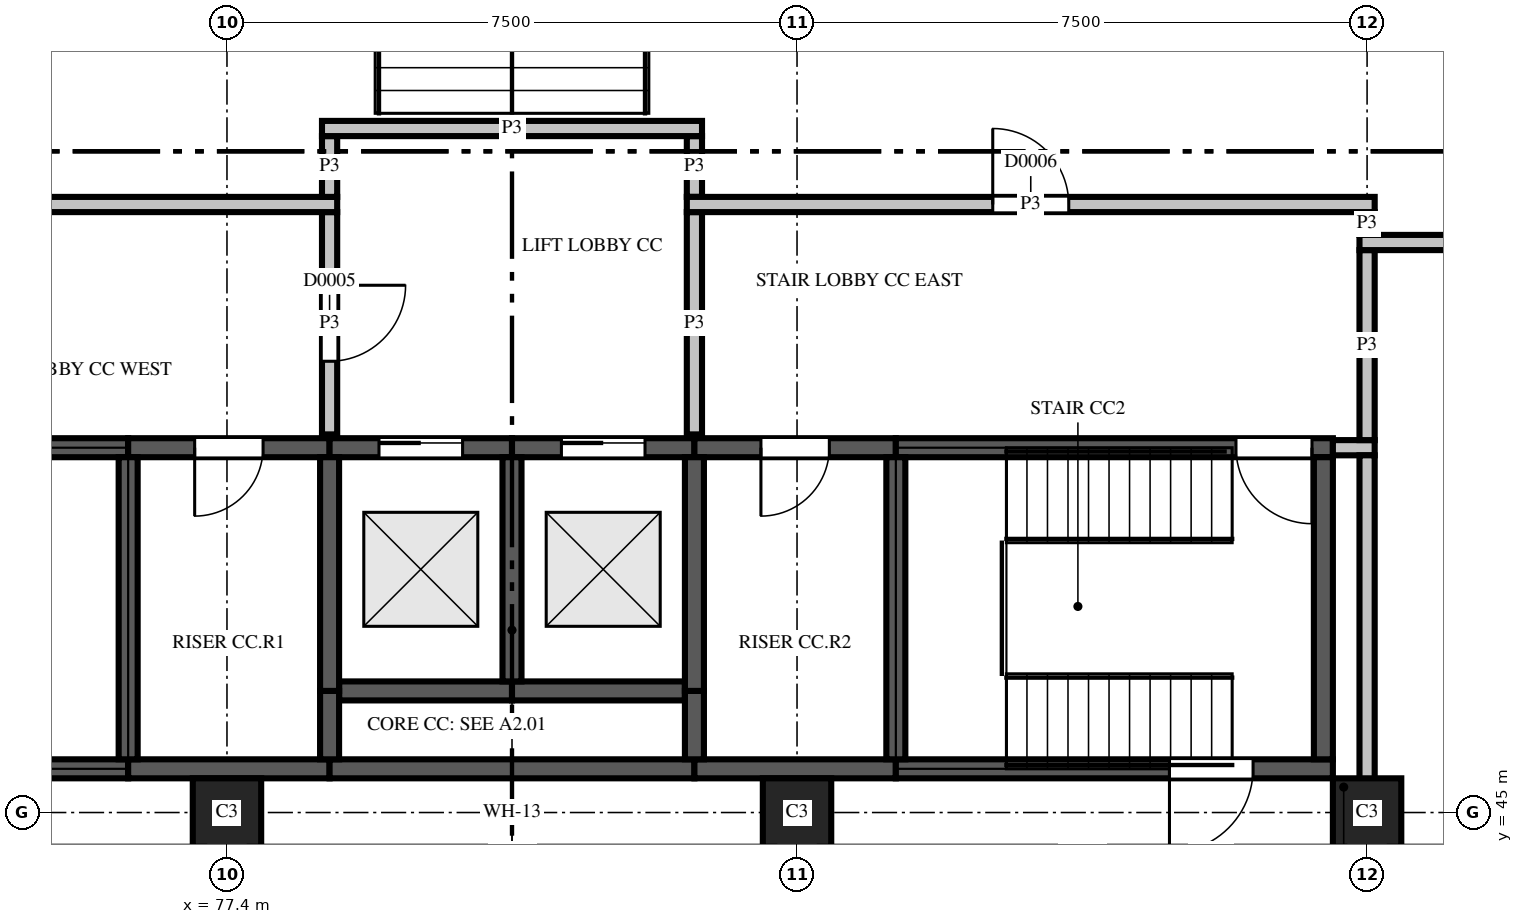
"""IFC4 building model, lengths in metres.
Left out: names, types, materials, properties, quantities, classifications, styles, units other than length and angle.
Written with IfcOpenShell. Run it as: python <this file> out.ifc"""

import sys

from ifc_helpers import new_model, si_unit, direction, frame, frame_2d, origin, place, context, subcontext, project, spatial, polyline, rectangle, outline, extrude, element, fill, save


model = new_model("IFC4")
c1 = context("Model", 3, precision=1e-05, world=origin(), true_north=direction((0.0, 1.0)))
c2 = subcontext(c1, "Body", "Model", "MODEL_VIEW")
j1 = project(units=[si_unit("LENGTHUNIT", "METRE"), si_unit("PLANEANGLEUNIT", "RADIAN")], contexts=[c1])
p1 = place(None, origin())
s1 = spatial("IfcSite", under=j1, at=p1, CompositionType="ELEMENT")
p2 = place(p1, origin())
s2 = spatial("IfcBuilding", under=s1, at=p2, CompositionType="ELEMENT")
p3 = place(p2, origin())
s3 = spatial("IfcBuildingStorey", under=s2, at=p3, CompositionType="ELEMENT", Elevation=0.0)
for number, where, z_axis, x_axis in (
    (1, (77.4, 45.0, 0.0), (0.0, 0.0, 1.0), (0.0, -1.0, 0.0)),
    (2, (84.9, 45.0, 0.0), (0.0, 0.0, 1.0), (0.0, -1.0, 0.0)),
    (3, (92.4, 45.0, 0.0), (0.0, 0.0, 1.0), (0.0, -1.0, 0.0)),
):
    element("IfcColumn", number, at=place(p3, frame(where, z_axis=z_axis, x_axis=x_axis)), inside=s3, PredefinedType="COLUMN", context=c2, shape_type="SweptSolid", body=[
        extrude(outline(polyline([(-0.45, -0.45), (0.45, -0.45), (0.45, -0.3), (0.75, -0.3), (0.75, 0.3), (0.45, 0.3), (0.45, 0.45), (-0.45, 0.45), (-0.45, -0.45)])), origin(), (0.0, 0.0, 1.0), 4.5),
    ])
p4 = place(p3, frame((70.35, 45.575, 0.0), z_axis=(0.0, 0.0, 1.0), x_axis=(1.0, 0.0, 0.0)))
e4 = element("IfcWall", 4, at=p4, inside=s3, PredefinedType="SHEAR", context=c2, shape_type="SweptSolid", body=[
    extrude(rectangle(XDim=5.75, YDim=0.25, at=frame_2d((2.875, 0.0))), origin(), (0.0, 0.0, 1.0), 4.5),
])
p5 = place(p4, frame((1.05, 0.0, 0.0)))
e5 = element("IfcOpeningElement", 5, at=p5, cuts=e4, PredefinedType="OPENING", context=c2, shape_type="SweptSolid", body=[
    extrude(rectangle(XDim=1.1, YDim=2.1, at=frame_2d((0.55, 1.05))), frame((0.0, 0.135, 0.0), z_axis=(0.0, -1.0, 0.0), x_axis=(1.0, 0.0, 0.0)), (0.0, 0.0, 1.0), 0.27),
])
p6 = place(p3, frame((76.1, 45.575, 0.0), z_axis=(0.0, 0.0, 1.0), x_axis=(1.0, 0.0, 0.0)))
e6 = element("IfcWall", 6, at=p6, inside=s3, PredefinedType="SHEAR", context=c2, shape_type="SweptSolid", body=[
    extrude(rectangle(XDim=2.65, YDim=0.25, at=frame_2d((1.325, 0.0))), origin(), (0.0, 0.0, 1.0), 4.5),
])
p7 = place(p3, frame((78.75, 45.575, 0.0), z_axis=(0.0, 0.0, 1.0), x_axis=(1.0, 0.0, 0.0)))
e7 = element("IfcWall", 7, at=p7, inside=s3, PredefinedType="SHEAR", context=c2, shape_type="SweptSolid", body=[
    extrude(rectangle(XDim=4.8, YDim=0.25, at=frame_2d((2.4, 0.0))), origin(), (0.0, 0.0, 1.0), 4.5),
])
p8 = place(p3, frame((83.55, 45.575, 0.0), z_axis=(0.0, 0.0, 1.0), x_axis=(1.0, 0.0, 0.0)))
e8 = element("IfcWall", 8, at=p8, inside=s3, PredefinedType="SHEAR", context=c2, shape_type="SweptSolid", body=[
    extrude(rectangle(XDim=2.65, YDim=0.25, at=frame_2d((1.325, 0.0))), origin(), (0.0, 0.0, 1.0), 4.5),
])
p9 = place(p3, frame((86.2, 45.575, 0.0), z_axis=(0.0, 0.0, 1.0), x_axis=(1.0, 0.0, 0.0)))
e9 = element("IfcWall", 9, at=p9, inside=s3, PredefinedType="SHEAR", context=c2, shape_type="SweptSolid", body=[
    extrude(rectangle(XDim=5.75, YDim=0.25, at=frame_2d((2.875, 0.0))), origin(), (0.0, 0.0, 1.0), 4.5),
])
p10 = place(p9, frame((3.6, 0.0, 0.0)))
e10 = element("IfcOpeningElement", 10, at=p10, cuts=e9, PredefinedType="OPENING", context=c2, shape_type="SweptSolid", body=[
    extrude(rectangle(XDim=1.1, YDim=2.1, at=frame_2d((0.55, 1.05))), frame((0.0, 0.135, 0.0), z_axis=(0.0, -1.0, 0.0), x_axis=(1.0, 0.0, 0.0)), (0.0, 0.0, 1.0), 0.27),
])
p11 = place(p3, frame((78.875, 46.6, -1.4), z_axis=(0.0, 0.0, 1.0), x_axis=(1.0, 0.0, 0.0)))
e11 = element("IfcWall", 11, at=p11, inside=s3, PredefinedType="SHEAR", context=c2, shape_type="SweptSolid", body=[
    extrude(rectangle(XDim=2.275, YDim=0.25, at=frame_2d((1.137, 0.0))), origin(), (0.0, 0.0, 1.0), 5.9),
])
p12 = place(p3, frame((81.15, 46.6, -1.4), z_axis=(0.0, 0.0, 1.0), x_axis=(1.0, 0.0, 0.0)))
e12 = element("IfcWall", 12, at=p12, inside=s3, PredefinedType="SHEAR", context=c2, shape_type="SweptSolid", body=[
    extrude(rectangle(XDim=2.275, YDim=0.25, at=frame_2d((1.138, 0.0))), origin(), (0.0, 0.0, 1.0), 5.9),
])
p13 = place(p3, frame((70.35, 49.8, 0.0), z_axis=(0.0, 0.0, 1.0), x_axis=(1.0, 0.0, 0.0)))
e13 = element("IfcWall", 13, at=p13, inside=s3, PredefinedType="SHEAR", context=c2, shape_type="SweptSolid", body=[
    extrude(rectangle(XDim=5.75, YDim=0.25, at=frame_2d((2.875, 0.0))), origin(), (0.0, 0.0, 1.0), 4.5),
])
p14 = place(p13, frame((0.275, 0.0, 0.0)))
e14 = element("IfcOpeningElement", 14, at=p14, cuts=e13, PredefinedType="OPENING", context=c2, shape_type="SweptSolid", body=[
    extrude(rectangle(XDim=1.0, YDim=2.1, at=frame_2d((0.5, 1.05))), frame((0.0, 0.135, 0.0), z_axis=(0.0, -1.0, 0.0), x_axis=(1.0, 0.0, 0.0)), (0.0, 0.0, 1.0), 0.27),
])
p15 = place(p3, frame((76.1, 49.8, 0.0), z_axis=(0.0, 0.0, 1.0), x_axis=(1.0, 0.0, 0.0)))
e15 = element("IfcWall", 15, at=p15, inside=s3, PredefinedType="SHEAR", context=c2, shape_type="SweptSolid", body=[
    extrude(rectangle(XDim=2.65, YDim=0.25, at=frame_2d((1.325, 0.0))), origin(), (0.0, 0.0, 1.0), 4.5),
])
p16 = place(p15, frame((0.875, 0.0, 0.0)))
e16 = element("IfcOpeningElement", 16, at=p16, cuts=e15, PredefinedType="OPENING", context=c2, shape_type="SweptSolid", body=[
    extrude(rectangle(XDim=0.9, YDim=2.1, at=frame_2d((0.45, 1.05))), frame((0.0, 0.135, 0.0), z_axis=(0.0, -1.0, 0.0), x_axis=(1.0, 0.0, 0.0)), (0.0, 0.0, 1.0), 0.27),
])
p17 = place(p3, frame((78.75, 49.8, -1.4), z_axis=(0.0, 0.0, 1.0), x_axis=(1.0, 0.0, 0.0)))
e17 = element("IfcWall", 17, at=p17, inside=s3, PredefinedType="SHEAR", context=c2, shape_type="SweptSolid", body=[
    extrude(rectangle(XDim=2.4, YDim=0.25, at=frame_2d((1.2, 0.0))), origin(), (0.0, 0.0, 1.0), 5.9),
])
p18 = place(p17, frame((0.65, 0.0, 1.4)))
e18 = element("IfcOpeningElement", 18, at=p18, cuts=e17, PredefinedType="OPENING", context=c2, shape_type="SweptSolid", body=[
    extrude(rectangle(XDim=1.1, YDim=2.1, at=frame_2d((0.55, 1.05))), frame((0.0, 0.135, 0.0), z_axis=(0.0, -1.0, 0.0), x_axis=(1.0, 0.0, 0.0)), (0.0, 0.0, 1.0), 0.27),
])
p19 = place(p3, frame((81.15, 49.8, -1.4), z_axis=(0.0, 0.0, 1.0), x_axis=(1.0, 0.0, 0.0)))
e19 = element("IfcWall", 19, at=p19, inside=s3, PredefinedType="SHEAR", context=c2, shape_type="SweptSolid", body=[
    extrude(rectangle(XDim=2.4, YDim=0.25, at=frame_2d((1.2, 0.0))), origin(), (0.0, 0.0, 1.0), 5.9),
])
p20 = place(p19, frame((0.65, 0.0, 1.4)))
e20 = element("IfcOpeningElement", 20, at=p20, cuts=e19, PredefinedType="OPENING", context=c2, shape_type="SweptSolid", body=[
    extrude(rectangle(XDim=1.1, YDim=2.1, at=frame_2d((0.55, 1.05))), frame((0.0, 0.135, 0.0), z_axis=(0.0, -1.0, 0.0), x_axis=(1.0, 0.0, 0.0)), (0.0, 0.0, 1.0), 0.27),
])
p21 = place(p3, frame((83.55, 49.8, 0.0), z_axis=(0.0, 0.0, 1.0), x_axis=(1.0, 0.0, 0.0)))
e21 = element("IfcWall", 21, at=p21, inside=s3, PredefinedType="SHEAR", context=c2, shape_type="SweptSolid", body=[
    extrude(rectangle(XDim=2.65, YDim=0.25, at=frame_2d((1.325, 0.0))), origin(), (0.0, 0.0, 1.0), 4.5),
])
p22 = place(p21, frame((0.875, 0.0, 0.0)))
e22 = element("IfcOpeningElement", 22, at=p22, cuts=e21, PredefinedType="OPENING", context=c2, shape_type="SweptSolid", body=[
    extrude(rectangle(XDim=0.9, YDim=2.1, at=frame_2d((0.45, 1.05))), frame((0.0, 0.135, 0.0), z_axis=(0.0, -1.0, 0.0), x_axis=(1.0, 0.0, 0.0)), (0.0, 0.0, 1.0), 0.27),
])
p23 = place(p3, frame((86.2, 49.8, 0.0), z_axis=(0.0, 0.0, 1.0), x_axis=(1.0, 0.0, 0.0)))
e23 = element("IfcWall", 23, at=p23, inside=s3, PredefinedType="SHEAR", context=c2, shape_type="SweptSolid", body=[
    extrude(rectangle(XDim=5.75, YDim=0.25, at=frame_2d((2.875, 0.0))), origin(), (0.0, 0.0, 1.0), 4.5),
])
p24 = place(p23, frame((4.475, 0.0, 0.0)))
e24 = element("IfcOpeningElement", 24, at=p24, cuts=e23, PredefinedType="OPENING", context=c2, shape_type="SweptSolid", body=[
    extrude(rectangle(XDim=1.0, YDim=2.1, at=frame_2d((0.5, 1.05))), frame((0.0, 0.135, 0.0), z_axis=(0.0, -1.0, 0.0), x_axis=(1.0, 0.0, 0.0)), (0.0, 0.0, 1.0), 0.27),
])
p25 = place(p3, frame((76.1, 45.7, 0.0), z_axis=(0.0, 0.0, 1.0), x_axis=(0.0, 1.0, 0.0)))
e25 = element("IfcWall", 25, at=p25, inside=s3, PredefinedType="SHEAR", context=c2, shape_type="SweptSolid", body=[
    extrude(rectangle(XDim=3.975, YDim=0.25, at=frame_2d((1.988, 0.0))), origin(), (0.0, 0.0, 1.0), 4.5),
])
p26 = place(p3, frame((78.75, 45.7, 0.0), z_axis=(0.0, 0.0, 1.0), x_axis=(0.0, 1.0, 0.0)))
e26 = element("IfcWall", 26, at=p26, inside=s3, PredefinedType="SHEAR", context=c2, shape_type="SweptSolid", body=[
    extrude(rectangle(XDim=0.9, YDim=0.25, at=frame_2d((0.45, 0.0))), origin(), (0.0, 0.0, 1.0), 4.5),
])
p27 = place(p3, frame((78.75, 46.6, -1.4), z_axis=(0.0, 0.0, 1.0), x_axis=(0.0, 1.0, 0.0)))
e27 = element("IfcWall", 27, at=p27, inside=s3, PredefinedType="SHEAR", context=c2, shape_type="SweptSolid", body=[
    extrude(rectangle(XDim=3.075, YDim=0.25, at=frame_2d((1.538, 0.0))), origin(), (0.0, 0.0, 1.0), 5.9),
])
p28 = place(p3, frame((81.15, 46.725, -1.4), z_axis=(0.0, 0.0, 1.0), x_axis=(0.0, 1.0, 0.0)))
e28 = element("IfcWall", 28, at=p28, inside=s3, PredefinedType="SHEAR", context=c2, shape_type="SweptSolid", body=[
    extrude(rectangle(XDim=2.95, YDim=0.25, at=frame_2d((1.475, 0.0))), origin(), (0.0, 0.0, 1.0), 5.9),
])
p29 = place(p3, frame((83.55, 45.7, 0.0), z_axis=(0.0, 0.0, 1.0), x_axis=(0.0, 1.0, 0.0)))
e29 = element("IfcWall", 29, at=p29, inside=s3, PredefinedType="SHEAR", context=c2, shape_type="SweptSolid", body=[
    extrude(rectangle(XDim=0.9, YDim=0.25, at=frame_2d((0.45, 0.0))), origin(), (0.0, 0.0, 1.0), 4.5),
])
p30 = place(p3, frame((83.55, 46.6, -1.4), z_axis=(0.0, 0.0, 1.0), x_axis=(0.0, 1.0, 0.0)))
e30 = element("IfcWall", 30, at=p30, inside=s3, PredefinedType="SHEAR", context=c2, shape_type="SweptSolid", body=[
    extrude(rectangle(XDim=3.075, YDim=0.25, at=frame_2d((1.538, 0.0))), origin(), (0.0, 0.0, 1.0), 5.9),
])
for number, where, z_axis, x_axis in (
    (31, (86.2, 45.7, 0.0), (0.0, 0.0, 1.0), (0.0, 1.0, 0.0)),
    (32, (91.825, 45.7, 0.0), (0.0, 0.0, 1.0), (0.0, 1.0, 0.0)),
):
    element("IfcWall", number, at=place(p3, frame(where, z_axis=z_axis, x_axis=x_axis)), inside=s3, PredefinedType="SHEAR", context=c2, shape_type="SweptSolid", body=[
        extrude(rectangle(XDim=3.975, YDim=0.25, at=frame_2d((1.988, 0.0))), origin(), (0.0, 0.0, 1.0), 4.5),
    ])
p31 = place(p3, frame((91.95, 49.8, 0.0), z_axis=(0.0, 0.0, 1.0), x_axis=(1.0, 0.0, 0.0)))
e33 = element("IfcWall", 33, at=p31, inside=s3, PredefinedType="PARTITIONING", context=c2, shape_type="SweptSolid", body=[
    extrude(rectangle(XDim=0.55, YDim=0.2, at=frame_2d((0.275, 0.0))), origin(), (0.0, 0.0, 1.0), 3.68),
])
p32 = place(p3, frame((92.4, 49.7, 0.0), z_axis=(0.0, 0.0, 1.0), x_axis=(0.0, -1.0, 0.0)))
e34 = element("IfcWall", 34, at=p32, inside=s3, PredefinedType="PARTITIONING", context=c2, shape_type="SweptSolid", body=[
    extrude(rectangle(XDim=4.64, YDim=0.2, at=frame_2d((2.32, 0.0))), origin(), (0.0, 0.0, 1.0), 3.68),
])
p33 = place(p3, frame((92.4, 49.9, 0.0), z_axis=(0.0, 0.0, 1.0), x_axis=(0.0, 1.0, 0.0)))
e35 = element("IfcWall", 35, at=p33, inside=s3, PredefinedType="PARTITIONING", context=c2, shape_type="SweptSolid", body=[
    extrude(rectangle(XDim=2.5, YDim=0.2, at=frame_2d((1.25, 0.0))), origin(), (0.0, 0.0, 1.0), 3.68),
])
p34 = place(p3, frame((78.75, 49.975, 0.0), z_axis=(0.0, 0.0, 1.0), x_axis=(0.0, 1.0, 0.0)))
e36 = element("IfcWall", 36, at=p34, inside=s3, PredefinedType="PARTITIONING", context=c2, shape_type="SweptSolid", body=[
    extrude(rectangle(XDim=2.925, YDim=0.2, at=frame_2d((1.462, 0.0))), origin(), (0.0, 0.0, 1.0), 3.68),
])
p35 = place(p34, frame((0.962, 0.0, 0.0)))
e37 = element("IfcOpeningElement", 37, at=p35, cuts=e36, PredefinedType="OPENING", context=c2, shape_type="SweptSolid", body=[
    extrude(rectangle(XDim=1.0, YDim=2.1, at=frame_2d((0.5, 1.05))), frame((0.0, 0.11, 0.0), z_axis=(0.0, -1.0, 0.0), x_axis=(1.0, 0.0, 0.0)), (0.0, 0.0, 1.0), 0.22),
])
p36 = place(p3, frame((83.55, 49.975, 0.0), z_axis=(0.0, 0.0, 1.0), x_axis=(0.0, 1.0, 0.0)))
e38 = element("IfcWall", 38, at=p36, inside=s3, PredefinedType="PARTITIONING", context=c2, shape_type="SweptSolid", body=[
    extrude(rectangle(XDim=2.925, YDim=0.2, at=frame_2d((1.462, 0.0))), origin(), (0.0, 0.0, 1.0), 3.68),
])
p37 = place(p3, frame((92.4, 52.6, 0.0), z_axis=(0.0, 0.0, 1.0), x_axis=(0.0, 1.0, 0.0)))
e39 = element("IfcWall", 39, at=p37, inside=s3, PredefinedType="PARTITIONING", context=c2, shape_type="SweptSolid", body=[
    extrude(rectangle(XDim=0.3, YDim=0.2, at=frame_2d((0.15, 0.0))), origin(), (0.0, 0.0, 1.0), 3.68),
])
p38 = place(p3, frame((99.9, 52.5, 0.0), z_axis=(0.0, 0.0, 1.0), x_axis=(-1.0, 0.0, 0.0)))
e40 = element("IfcWall", 40, at=p38, inside=s3, PredefinedType="PARTITIONING", context=c2, shape_type="SweptSolid", body=[
    extrude(rectangle(XDim=7.6, YDim=0.2, at=frame_2d((3.8, 0.0))), origin(), (0.0, 0.0, 1.0), 3.68),
])
p39 = place(p38, frame((3.3, 0.0, 0.0)))
e41 = element("IfcOpeningElement", 41, at=p39, cuts=e40, PredefinedType="OPENING", context=c2, shape_type="SweptSolid", body=[
    extrude(rectangle(XDim=1.0, YDim=2.1, at=frame_2d((0.5, 1.05))), frame((0.0, 0.11, 0.0), z_axis=(0.0, -1.0, 0.0), x_axis=(1.0, 0.0, 0.0)), (0.0, 0.0, 1.0), 0.22),
])
p40 = place(p3, frame((78.85, 53.0, 0.0), z_axis=(0.0, 0.0, 1.0), x_axis=(-1.0, 0.0, 0.0)))
e42 = element("IfcWall", 42, at=p40, inside=s3, PredefinedType="PARTITIONING", context=c2, shape_type="SweptSolid", body=[
    extrude(rectangle(XDim=9.05, YDim=0.2, at=frame_2d((4.525, 0.0))), origin(), (0.0, 0.0, 1.0), 3.68),
])
p41 = place(p40, frame((4.025, 0.0, 0.0)))
e43 = element("IfcOpeningElement", 43, at=p41, cuts=e42, PredefinedType="OPENING", context=c2, shape_type="SweptSolid", body=[
    extrude(rectangle(XDim=1.0, YDim=2.1, at=frame_2d((0.5, 1.05))), frame((0.0, 0.11, 0.0), z_axis=(0.0, -1.0, 0.0), x_axis=(1.0, 0.0, 0.0)), (0.0, 0.0, 1.0), 0.22),
])
p42 = place(p3, frame((83.55, 53.1, 0.0), z_axis=(0.0, 0.0, 1.0), x_axis=(0.0, 1.0, 0.0)))
e44 = element("IfcWall", 44, at=p42, inside=s3, PredefinedType="PARTITIONING", context=c2, shape_type="SweptSolid", body=[
    extrude(rectangle(XDim=0.8, YDim=0.2, at=frame_2d((0.4, 0.0))), origin(), (0.0, 0.0, 1.0), 3.68),
])
p43 = place(p3, frame((92.5, 53.0, 0.0), z_axis=(0.0, 0.0, 1.0), x_axis=(-1.0, 0.0, 0.0)))
e45 = element("IfcWall", 45, at=p43, inside=s3, PredefinedType="PARTITIONING", context=c2, shape_type="SweptSolid", body=[
    extrude(rectangle(XDim=9.05, YDim=0.2, at=frame_2d((4.525, 0.0))), origin(), (0.0, 0.0, 1.0), 3.68),
])
p44 = place(p43, frame((4.025, 0.0, 0.0)))
e46 = element("IfcOpeningElement", 46, at=p44, cuts=e45, PredefinedType="OPENING", context=c2, shape_type="SweptSolid", body=[
    extrude(rectangle(XDim=1.0, YDim=2.1, at=frame_2d((0.5, 1.05))), frame((0.0, 0.11, 0.0), z_axis=(0.0, -1.0, 0.0), x_axis=(1.0, 0.0, 0.0)), (0.0, 0.0, 1.0), 0.22),
])
p45 = place(p3, frame((78.75, 53.9, 0.0), z_axis=(0.0, 0.0, 1.0), x_axis=(0.0, -1.0, 0.0)))
e47 = element("IfcWall", 47, at=p45, inside=s3, PredefinedType="PARTITIONING", context=c2, shape_type="SweptSolid", body=[
    extrude(rectangle(XDim=0.8, YDim=0.2, at=frame_2d((0.4, 0.0))), origin(), (0.0, 0.0, 1.0), 3.68),
])
p46 = place(p3, frame((83.65, 54.0, 0.0), z_axis=(0.0, 0.0, 1.0), x_axis=(-1.0, 0.0, 0.0)))
e48 = element("IfcWall", 48, at=p46, inside=s3, PredefinedType="PARTITIONING", context=c2, shape_type="SweptSolid", body=[
    extrude(rectangle(XDim=5.0, YDim=0.2, at=frame_2d((2.5, 0.0))), origin(), (0.0, 0.0, 1.0), 3.68),
])
p47 = place(p10, frame((1.1, 0.0, 0.0), z_axis=(0.0, 0.0, 1.0), x_axis=(-1.0, 0.0, 0.0)))
e49 = element("IfcDoor", 49, at=p47, inside=s3, OperationType="SINGLE_SWING_LEFT", PredefinedType="DOOR", context=c2, shape_type="SweptSolid", body=[
    extrude(rectangle(XDim=1.1, YDim=2.1, at=frame_2d((0.55, 1.05))), frame((0.0, 0.025, 0.0), z_axis=(0.0, -1.0, 0.0), x_axis=(1.0, 0.0, 0.0)), (0.0, 0.0, 1.0), 0.05),
])
fill(e10, e49)
p48 = place(p35, origin())
e50 = element("IfcDoor", 50, at=p48, inside=s3, OperationType="SINGLE_SWING_RIGHT", PredefinedType="DOOR", context=c2, shape_type="SweptSolid", body=[
    extrude(rectangle(XDim=1.0, YDim=2.1, at=frame_2d((0.5, 1.05))), frame((0.0, 0.025, 0.0), z_axis=(0.0, -1.0, 0.0), x_axis=(1.0, 0.0, 0.0)), (0.0, 0.0, 1.0), 0.05),
])
fill(e37, e50)
p49 = place(p44, origin())
e51 = element("IfcDoor", 51, at=p49, inside=s3, OperationType="SINGLE_SWING_RIGHT", PredefinedType="DOOR", context=c2, shape_type="SweptSolid", body=[
    extrude(rectangle(XDim=1.0, YDim=2.1, at=frame_2d((0.5, 1.05))), frame((0.0, 0.025, 0.0), z_axis=(0.0, -1.0, 0.0), x_axis=(1.0, 0.0, 0.0)), (0.0, 0.0, 1.0), 0.05),
])
fill(e46, e51)
p50 = place(p18, origin())
e52 = element("IfcDoor", 52, at=p50, inside=s3, OperationType="SLIDING_TO_LEFT", PredefinedType="DOOR", context=c2, shape_type="SweptSolid", body=[
    extrude(rectangle(XDim=1.1, YDim=2.1, at=frame_2d((0.55, 1.05))), frame((0.0, 0.025, 0.0), z_axis=(0.0, -1.0, 0.0), x_axis=(1.0, 0.0, 0.0)), (0.0, 0.0, 1.0), 0.05),
])
fill(e18, e52)
p51 = place(p20, origin())
e53 = element("IfcDoor", 53, at=p51, inside=s3, OperationType="SLIDING_TO_LEFT", PredefinedType="DOOR", context=c2, shape_type="SweptSolid", body=[
    extrude(rectangle(XDim=1.1, YDim=2.1, at=frame_2d((0.55, 1.05))), frame((0.0, 0.025, 0.0), z_axis=(0.0, -1.0, 0.0), x_axis=(1.0, 0.0, 0.0)), (0.0, 0.0, 1.0), 0.05),
])
fill(e20, e53)
p52 = place(p24, origin())
e54 = element("IfcDoor", 54, at=p52, inside=s3, OperationType="SINGLE_SWING_RIGHT", PredefinedType="DOOR", context=c2, shape_type="SweptSolid", body=[
    extrude(rectangle(XDim=1.0, YDim=2.1, at=frame_2d((0.5, 1.05))), frame((0.0, 0.025, 0.0), z_axis=(0.0, -1.0, 0.0), x_axis=(1.0, 0.0, 0.0)), (0.0, 0.0, 1.0), 0.05),
])
fill(e24, e54)
p53 = place(p16, origin())
e55 = element("IfcDoor", 55, at=p53, inside=s3, OperationType="SINGLE_SWING_LEFT", PredefinedType="DOOR", context=c2, shape_type="SweptSolid", body=[
    extrude(rectangle(XDim=0.9, YDim=2.1, at=frame_2d((0.45, 1.05))), frame((0.0, 0.025, 0.0), z_axis=(0.0, -1.0, 0.0), x_axis=(1.0, 0.0, 0.0)), (0.0, 0.0, 1.0), 0.05),
])
fill(e16, e55)
p54 = place(p22, origin())
e56 = element("IfcDoor", 56, at=p54, inside=s3, OperationType="SINGLE_SWING_LEFT", PredefinedType="DOOR", context=c2, shape_type="SweptSolid", body=[
    extrude(rectangle(XDim=0.9, YDim=2.1, at=frame_2d((0.45, 1.05))), frame((0.0, 0.025, 0.0), z_axis=(0.0, -1.0, 0.0), x_axis=(1.0, 0.0, 0.0)), (0.0, 0.0, 1.0), 0.05),
])
fill(e22, e56)
save(model, sys.argv[1])
